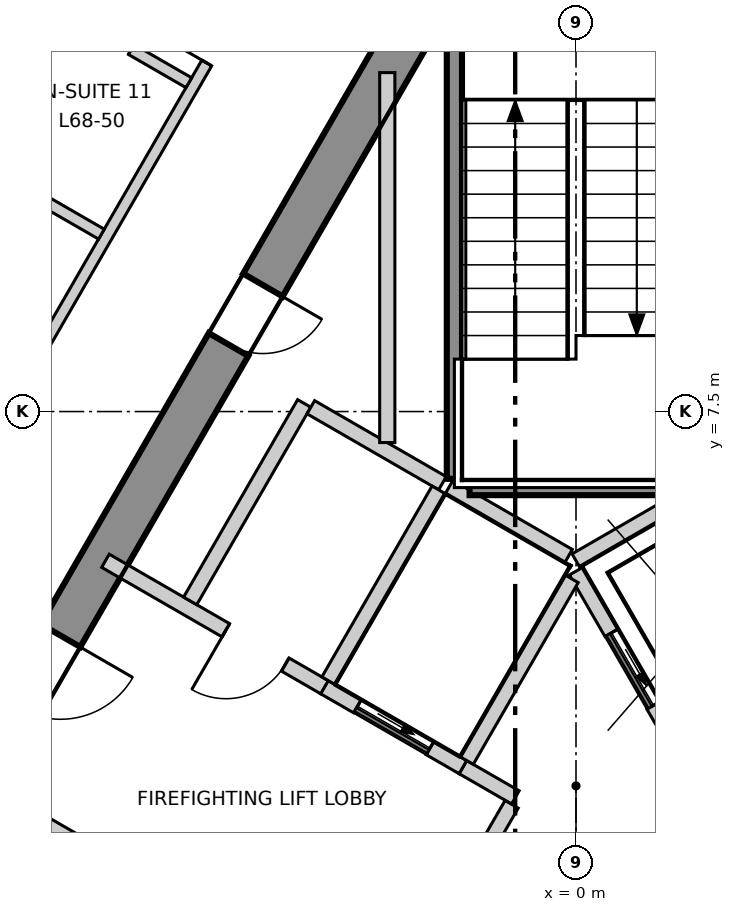
"""IFC4 building model, lengths in metres.
Left out: names, types, materials, properties, quantities, classifications, styles, units other than length and angle.
Written with IfcOpenShell. Run it as: python <this file> out.ifc"""

import sys

from ifc_helpers import new_model, si_unit, direction, frame, frame_2d, origin, place, context, subcontext, project, spatial, polyline, rectangle, outline, extrude, element, fill, save


model = new_model("IFC4")
c1 = context("Model", 3, precision=1e-05, world=origin(), true_north=direction((0.0, 1.0)))
c2 = subcontext(c1, "Body", "Model", "MODEL_VIEW")
j1 = project(units=[si_unit("LENGTHUNIT", "METRE"), si_unit("PLANEANGLEUNIT", "RADIAN")], contexts=[c1])
p1 = place(None, origin())
s1 = spatial("IfcSite", under=j1, at=p1, CompositionType="ELEMENT")
p2 = place(p1, origin())
s2 = spatial("IfcBuilding", under=s1, at=p2, CompositionType="ELEMENT")
p3 = place(p2, frame((0.0, 0.0, 289.9)))
s3 = spatial("IfcBuildingStorey", under=s2, at=p3, CompositionType="ELEMENT", Elevation=289.9)
p4 = place(p3, frame((-1.732, 13.3, -0.3), z_axis=(0.0, 0.0, 1.0), x_axis=(-0.500000539815, -0.866025092122, 0.0)))
e1 = element("IfcWall", 1, at=p4, inside=s3, PredefinedType="SHEAR", context=c2, shape_type="SweptSolid", body=[
    extrude(outline(polyline([(-0.173, -0.3), (1.795, -0.3), (3.763, -0.3), (5.732, -0.3), (7.7, -0.3), (9.668, -0.301), (11.637, -0.301), (13.605, -0.301), (15.573, -0.301), (17.542, -0.301), (19.51, -0.301), (21.478, -0.301), (21.131, 0.3), (19.226, 0.3), (17.321, 0.3), (15.415, 0.3), (13.51, 0.3), (11.605, 0.3), (9.699, 0.3), (7.794, 0.3), (5.889, 0.3), (3.984, 0.3), (2.078, 0.3), (0.173, 0.3), (-0.173, -0.3)])), origin(), (0.0, 0.0, 1.0), 3.6),
])
p5 = place(p4, frame((10.102, 0.0, 0.3)))
e2 = element("IfcOpeningElement", 2, at=p5, cuts=e1, PredefinedType="OPENING", context=c2, shape_type="SweptSolid", body=[
    extrude(rectangle(XDim=1.1, YDim=2.1, at=frame_2d((0.55, 1.05))), frame((0.0, 0.31, 0.0), z_axis=(0.0, -1.0, 0.0), x_axis=(1.0, 0.0, 0.0)), (0.0, 0.0, 1.0), 0.621),
])
p6 = place(p4, frame((16.328, 0.0, 0.3)))
e3 = element("IfcOpeningElement", 3, at=p6, cuts=e1, PredefinedType="OPENING", context=c2, shape_type="SweptSolid", body=[
    extrude(rectangle(XDim=1.0, YDim=2.1, at=frame_2d((0.5, 1.05))), frame((0.0, 0.31, 0.0), z_axis=(0.0, -1.0, 0.0), x_axis=(1.0, 0.0, 0.0)), (0.0, 0.0, 1.0), 0.621),
])
p7 = place(p4, frame((4.777, 0.0, 0.3)))
e4 = element("IfcOpeningElement", 4, at=p7, cuts=e1, PredefinedType="OPENING", context=c2, shape_type="SweptSolid", body=[
    extrude(rectangle(XDim=0.9, YDim=2.1, at=frame_2d((0.45, 1.05))), frame((0.0, 0.31, 0.0), z_axis=(0.0, -1.0, 0.0), x_axis=(1.0, 0.0, 0.0)), (0.0, 0.0, 1.0), 0.621),
])
p8 = place(p3, frame((-2.494, 27.86, 0.0), z_axis=(0.0, 0.0, 1.0), x_axis=(-0.500008134474, -0.866020707292, 0.0)))
e5 = element("IfcWall", 5, at=p8, inside=s3, PredefinedType="ELEMENTEDWALL", context=c2, shape_type="SweptSolid", body=[
    extrude(rectangle(XDim=45.741, YDim=0.2, at=frame_2d((22.871, 0.0))), origin(), (0.0, 0.0, 1.0), 3.3),
])
p9 = place(p8, frame((2.15, 0.0, 0.9)))
e6 = element("IfcOpeningElement", 6, at=p9, cuts=e5, PredefinedType="OPENING", context=c2, shape_type="SweptSolid", body=[
    extrude(rectangle(XDim=3.7, YDim=2.2, at=frame_2d((1.85, 1.1))), frame((0.0, 0.11, 0.0), z_axis=(0.0, -1.0, 0.0), x_axis=(1.0, 0.0, 0.0)), (0.0, 0.0, 1.0), 0.22),
])
p10 = place(p8, frame((7.544, 0.0, 0.9)))
e7 = element("IfcOpeningElement", 7, at=p10, cuts=e5, PredefinedType="OPENING", context=c2, shape_type="SweptSolid", body=[
    extrude(rectangle(XDim=3.7, YDim=2.2, at=frame_2d((1.85, 1.1))), frame((0.0, 0.11, 0.0), z_axis=(0.0, -1.0, 0.0), x_axis=(1.0, 0.0, 0.0)), (0.0, 0.0, 1.0), 0.22),
])
p11 = place(p8, frame((12.939, 0.0, 0.9)))
e8 = element("IfcOpeningElement", 8, at=p11, cuts=e5, PredefinedType="OPENING", context=c2, shape_type="SweptSolid", body=[
    extrude(rectangle(XDim=3.7, YDim=2.2, at=frame_2d((1.85, 1.1))), frame((0.0, 0.11, 0.0), z_axis=(0.0, -1.0, 0.0), x_axis=(1.0, 0.0, 0.0)), (0.0, 0.0, 1.0), 0.22),
])
p12 = place(p8, frame((18.333, 0.0, 0.9)))
e9 = element("IfcOpeningElement", 9, at=p12, cuts=e5, PredefinedType="OPENING", context=c2, shape_type="SweptSolid", body=[
    extrude(rectangle(XDim=3.7, YDim=2.2, at=frame_2d((1.85, 1.1))), frame((0.0, 0.11, 0.0), z_axis=(0.0, -1.0, 0.0), x_axis=(1.0, 0.0, 0.0)), (0.0, 0.0, 1.0), 0.22),
])
p13 = place(p8, frame((23.728, 0.0, 0.9)))
e10 = element("IfcOpeningElement", 10, at=p13, cuts=e5, PredefinedType="OPENING", context=c2, shape_type="SweptSolid", body=[
    extrude(rectangle(XDim=3.7, YDim=2.2, at=frame_2d((1.85, 1.1))), frame((0.0, 0.11, 0.0), z_axis=(0.0, -1.0, 0.0), x_axis=(1.0, 0.0, 0.0)), (0.0, 0.0, 1.0), 0.22),
])
p14 = place(p8, frame((29.122, 0.0, 0.9)))
e11 = element("IfcOpeningElement", 11, at=p14, cuts=e5, PredefinedType="OPENING", context=c2, shape_type="SweptSolid", body=[
    extrude(rectangle(XDim=3.7, YDim=2.2, at=frame_2d((1.85, 1.1))), frame((0.0, 0.11, 0.0), z_axis=(0.0, -1.0, 0.0), x_axis=(1.0, 0.0, 0.0)), (0.0, 0.0, 1.0), 0.22),
])
p15 = place(p8, frame((34.517, 0.0, 0.9)))
e12 = element("IfcOpeningElement", 12, at=p15, cuts=e5, PredefinedType="OPENING", context=c2, shape_type="SweptSolid", body=[
    extrude(rectangle(XDim=3.7, YDim=2.2, at=frame_2d((1.85, 1.1))), frame((0.0, 0.11, 0.0), z_axis=(0.0, -1.0, 0.0), x_axis=(1.0, 0.0, 0.0)), (0.0, 0.0, 1.0), 0.22),
])
p16 = place(p8, frame((39.911, 0.0, 0.9)))
e13 = element("IfcOpeningElement", 13, at=p16, cuts=e5, PredefinedType="OPENING", context=c2, shape_type="SweptSolid", body=[
    extrude(rectangle(XDim=3.7, YDim=2.2, at=frame_2d((1.85, 1.1))), frame((0.0, 0.11, 0.0), z_axis=(0.0, -1.0, 0.0), x_axis=(1.0, 0.0, 0.0)), (0.0, 0.0, 1.0), 0.22),
])
p17 = place(p3, frame((-17.679, -10.12, 0.0), z_axis=(0.0, 0.0, 1.0), x_axis=(0.500008955215, 0.866020233427, 0.0)))
e14 = element("IfcWall", 14, at=p17, inside=s3, PredefinedType="PARTITIONING", context=c2, shape_type="SweptSolid", body=[
    extrude(rectangle(XDim=35.357, YDim=0.15, at=frame_2d((17.679, 0.0))), origin(), (0.0, 0.0, 1.0), 3.3),
])
p18 = place(p17, frame((31.407, 0.0, 0.0)))
e15 = element("IfcOpeningElement", 15, at=p18, cuts=e14, PredefinedType="OPENING", context=c2, shape_type="SweptSolid", body=[
    extrude(rectangle(XDim=1.0, YDim=2.1, at=frame_2d((0.5, 1.05))), frame((0.0, 0.085, 0.0), z_axis=(0.0, -1.0, 0.0), x_axis=(1.0, 0.0, 0.0)), (0.0, 0.0, 1.0), 0.17),
])
p19 = place(p17, frame((25.642, 0.0, 0.0)))
e16 = element("IfcOpeningElement", 16, at=p19, cuts=e14, PredefinedType="OPENING", context=c2, shape_type="SweptSolid", body=[
    extrude(rectangle(XDim=1.0, YDim=2.1, at=frame_2d((0.5, 1.05))), frame((0.0, 0.085, 0.0), z_axis=(0.0, -1.0, 0.0), x_axis=(1.0, 0.0, 0.0)), (0.0, 0.0, 1.0), 0.17),
])
p20 = place(p17, frame((18.348, 0.0, 0.0)))
e17 = element("IfcOpeningElement", 17, at=p20, cuts=e14, PredefinedType="OPENING", context=c2, shape_type="SweptSolid", body=[
    extrude(rectangle(XDim=1.0, YDim=2.1, at=frame_2d((0.5, 1.05))), frame((0.0, 0.085, 0.0), z_axis=(0.0, -1.0, 0.0), x_axis=(1.0, 0.0, 0.0)), (0.0, 0.0, 1.0), 0.17),
])
p21 = place(p17, frame((13.254, 0.0, 0.0)))
e18 = element("IfcOpeningElement", 18, at=p21, cuts=e14, PredefinedType="OPENING", context=c2, shape_type="SweptSolid", body=[
    extrude(rectangle(XDim=1.0, YDim=2.1, at=frame_2d((0.5, 1.05))), frame((0.0, 0.085, 0.0), z_axis=(0.0, -1.0, 0.0), x_axis=(1.0, 0.0, 0.0)), (0.0, 0.0, 1.0), 0.17),
])
p22 = place(p17, frame((7.559, 0.0, 0.0)))
e19 = element("IfcOpeningElement", 19, at=p22, cuts=e14, PredefinedType="OPENING", context=c2, shape_type="SweptSolid", body=[
    extrude(rectangle(XDim=1.0, YDim=2.1, at=frame_2d((0.5, 1.05))), frame((0.0, 0.085, 0.0), z_axis=(0.0, -1.0, 0.0), x_axis=(1.0, 0.0, 0.0)), (0.0, 0.0, 1.0), 0.17),
])
p23 = place(p17, frame((2.865, 0.0, 0.0)))
e20 = element("IfcOpeningElement", 20, at=p23, cuts=e14, PredefinedType="OPENING", context=c2, shape_type="SweptSolid", body=[
    extrude(rectangle(XDim=1.0, YDim=2.1, at=frame_2d((0.5, 1.05))), frame((0.0, 0.085, 0.0), z_axis=(0.0, -1.0, 0.0), x_axis=(1.0, 0.0, 0.0)), (0.0, 0.0, 1.0), 0.17),
])
p24 = place(p3, frame((-11.168, 12.677, 0.0), z_axis=(0.0, 0.0, 1.0), x_axis=(0.866017549727, -0.50001360338, 0.0)))
e21 = element("IfcWall", 21, at=p24, inside=s3, PredefinedType="PARTITIONING", context=c2, shape_type="SweptSolid", body=[
    extrude(rectangle(XDim=5.686, YDim=0.15, at=frame_2d((2.843, 0.0))), origin(), (0.0, 0.0, 1.0), 3.3),
])
p25 = place(p3, frame((0.075, 20.37, 0.0), z_axis=(0.0, 0.0, 1.0), x_axis=(0.500009775255, -0.866019759965, 0.0)))
e22 = element("IfcWall", 22, at=p25, inside=s3, PredefinedType="PARTITIONING", context=c2, shape_type="SweptSolid", body=[
    extrude(rectangle(XDim=35.207, YDim=0.15, at=frame_2d((17.604, 0.0))), origin(), (0.0, 0.0, 1.0), 3.3),
])
p26 = place(p25, frame((31.407, 0.0, 0.0)))
e23 = element("IfcOpeningElement", 23, at=p26, cuts=e22, PredefinedType="OPENING", context=c2, shape_type="SweptSolid", body=[
    extrude(rectangle(XDim=1.0, YDim=2.1, at=frame_2d((0.5, 1.05))), frame((0.0, 0.085, 0.0), z_axis=(0.0, -1.0, 0.0), x_axis=(1.0, 0.0, 0.0)), (0.0, 0.0, 1.0), 0.17),
])
p27 = place(p25, frame((19.243, 0.0, 0.0)))
e24 = element("IfcOpeningElement", 24, at=p27, cuts=e22, PredefinedType="OPENING", context=c2, shape_type="SweptSolid", body=[
    extrude(rectangle(XDim=1.0, YDim=2.1, at=frame_2d((0.5, 1.05))), frame((0.0, 0.085, 0.0), z_axis=(0.0, -1.0, 0.0), x_axis=(1.0, 0.0, 0.0)), (0.0, 0.0, 1.0), 0.17),
])
p28 = place(p25, frame((24.543, 0.0, 0.0)))
e25 = element("IfcOpeningElement", 25, at=p28, cuts=e22, PredefinedType="OPENING", context=c2, shape_type="SweptSolid", body=[
    extrude(rectangle(XDim=0.9, YDim=2.1, at=frame_2d((0.45, 1.05))), frame((0.0, 0.085, 0.0), z_axis=(0.0, -1.0, 0.0), x_axis=(1.0, 0.0, 0.0)), (0.0, 0.0, 1.0), 0.17),
])
p29 = place(p25, frame((22.443, 0.0, 0.0)))
e26 = element("IfcOpeningElement", 26, at=p29, cuts=e22, PredefinedType="OPENING", context=c2, shape_type="SweptSolid", body=[
    extrude(rectangle(XDim=0.9, YDim=2.1, at=frame_2d((0.45, 1.05))), frame((0.0, 0.085, 0.0), z_axis=(0.0, -1.0, 0.0), x_axis=(1.0, 0.0, 0.0)), (0.0, 0.0, 1.0), 0.17),
])
p30 = place(p25, frame((13.253, 0.0, 0.0)))
e27 = element("IfcOpeningElement", 27, at=p30, cuts=e22, PredefinedType="OPENING", context=c2, shape_type="SweptSolid", body=[
    extrude(rectangle(XDim=1.0, YDim=2.1, at=frame_2d((0.5, 1.05))), frame((0.0, 0.085, 0.0), z_axis=(0.0, -1.0, 0.0), x_axis=(1.0, 0.0, 0.0)), (0.0, 0.0, 1.0), 0.17),
])
p31 = place(p25, frame((5.559, 0.0, 0.0)))
e28 = element("IfcOpeningElement", 28, at=p31, cuts=e22, PredefinedType="OPENING", context=c2, shape_type="SweptSolid", body=[
    extrude(rectangle(XDim=1.0, YDim=2.1, at=frame_2d((0.5, 1.05))), frame((0.0, 0.085, 0.0), z_axis=(0.0, -1.0, 0.0), x_axis=(1.0, 0.0, 0.0)), (0.0, 0.0, 1.0), 0.17),
])
p32 = place(p3, frame((-7.303, 13.101, 0.0), z_axis=(0.0, 0.0, 1.0), x_axis=(0.866061263272, -0.499937884402, 0.0)))
e29 = element("IfcWall", 29, at=p32, inside=s3, PredefinedType="PARTITIONING", context=c2, shape_type="SweptSolid", body=[
    extrude(rectangle(XDim=2.551, YDim=0.15, at=frame_2d((1.275, 0.0))), origin(), (0.0, 0.0, 1.0), 3.3),
])
p33 = place(p32, frame((0.775, 0.0, 0.0)))
e30 = element("IfcOpeningElement", 30, at=p33, cuts=e29, PredefinedType="OPENING", context=c2, shape_type="SweptSolid", body=[
    extrude(rectangle(XDim=0.9, YDim=2.1, at=frame_2d((0.45, 1.05))), frame((0.0, 0.085, 0.0), z_axis=(0.0, -1.0, 0.0), x_axis=(1.0, 0.0, 0.0)), (0.0, 0.0, 1.0), 0.17),
])
p34 = place(p3, frame((-0.002, 5.541, 0.0), z_axis=(0.0, 0.0, 1.0), x_axis=(0.86600155993, 0.500041296494, 0.0)))
e31 = element("IfcWall", 31, at=p34, inside=s3, PredefinedType="SOLIDWALL", context=c2, shape_type="SweptSolid", body=[
    extrude(rectangle(XDim=4.132, YDim=0.2, at=frame_2d((2.066, 0.0))), origin(), (0.0, 0.0, 1.0), 3.3),
])
p35 = place(p3, frame((0.0, 5.4, 0.0), z_axis=(0.0, 0.0, 1.0), x_axis=(0.500103862429, -0.865965430478, 0.0)))
e32 = element("IfcWall", 32, at=p35, inside=s3, PredefinedType="SOLIDWALL", context=c2, shape_type="SweptSolid", body=[
    extrude(rectangle(XDim=2.973, YDim=0.2, at=frame_2d((1.487, 0.0))), origin(), (0.0, 0.0, 1.0), 3.3),
])
p36 = place(p35, frame((0.937, 0.0, 0.0)))
e33 = element("IfcOpeningElement", 33, at=p36, cuts=e32, PredefinedType="OPENING", context=c2, shape_type="SweptSolid", body=[
    extrude(rectangle(XDim=1.1, YDim=2.1, at=frame_2d((0.55, 1.05))), frame((0.0, 0.11, 0.0), z_axis=(0.0, -1.0, 0.0), x_axis=(1.0, 0.0, 0.0)), (0.0, 0.0, 1.0), 0.22),
])
p37 = place(p3, frame((-7.891, 2.593, 0.0), z_axis=(0.0, 0.0, 1.0), x_axis=(0.866070917804, -0.499921159118, 0.0)))
e34 = element("IfcWall", 34, at=p37, inside=s3, PredefinedType="SOLIDWALL", context=c2, shape_type="SweptSolid", body=[
    extrude(rectangle(XDim=3.333, YDim=0.2, at=frame_2d((1.666, 0.0))), origin(), (0.0, 0.0, 1.0), 3.3),
])
p38 = place(p37, frame((1.73, 0.0, 0.0)))
e35 = element("IfcOpeningElement", 35, at=p38, cuts=e34, PredefinedType="OPENING", context=c2, shape_type="SweptSolid", body=[
    extrude(rectangle(XDim=1.1, YDim=2.1, at=frame_2d((0.55, 1.05))), frame((0.0, 0.11, 0.0), z_axis=(0.0, -1.0, 0.0), x_axis=(1.0, 0.0, 0.0)), (0.0, 0.0, 1.0), 0.22),
])
p39 = place(p3, frame((-6.191, 5.537, 0.0), z_axis=(0.0, 0.0, 1.0), x_axis=(0.866052607023, -0.499952879648, 0.0)))
e36 = element("IfcWall", 36, at=p39, inside=s3, PredefinedType="SOLIDWALL", context=c2, shape_type="SweptSolid", body=[
    extrude(rectangle(XDim=3.332, YDim=0.2, at=frame_2d((1.666, 0.0))), origin(), (0.0, 0.0, 1.0), 3.3),
])
p40 = place(p39, frame((1.83, 0.0, 0.0)))
e37 = element("IfcOpeningElement", 37, at=p40, cuts=e36, PredefinedType="OPENING", context=c2, shape_type="SweptSolid", body=[
    extrude(rectangle(XDim=0.9, YDim=2.1, at=frame_2d((0.45, 1.05))), frame((0.0, 0.11, 0.0), z_axis=(0.0, -1.0, 0.0), x_axis=(1.0, 0.0, 0.0)), (0.0, 0.0, 1.0), 0.22),
])
p41 = place(p3, frame((-1.488, 2.822, 0.0), z_axis=(0.0, 0.0, 1.0), x_axis=(0.866236612152, -0.499633997809, 0.0)))
e38 = element("IfcWall", 38, at=p41, inside=s3, PredefinedType="SOLIDWALL", context=c2, shape_type="SweptSolid", body=[
    extrude(rectangle(XDim=0.796, YDim=0.2, at=frame_2d((0.398, 0.0))), origin(), (0.0, 0.0, 1.0), 3.3),
])
p42 = place(p3, frame((-5.076, 5.009, 0.0), z_axis=(0.0, 0.0, 1.0), x_axis=(0.50002537861, 0.866010750942, 0.0)))
e39 = element("IfcWall", 39, at=p42, inside=s3, PredefinedType="SOLIDWALL", context=c2, shape_type="SweptSolid", body=[
    extrude(rectangle(XDim=3.0, YDim=0.2, at=frame_2d((1.5, 0.0))), origin(), (0.0, 0.0, 1.0), 3.3),
])
p43 = place(p3, frame((-3.489, 7.557, 0.0), z_axis=(0.0, 0.0, 1.0), x_axis=(0.866010750942, -0.50002537861, 0.0)))
e40 = element("IfcWall", 40, at=p43, inside=s3, PredefinedType="SOLIDWALL", context=c2, shape_type="SweptSolid", body=[
    extrude(rectangle(XDim=2.0, YDim=0.2, at=frame_2d((1.0, 0.0))), origin(), (0.0, 0.0, 1.0), 3.3),
])
p44 = place(p3, frame((-2.444, -0.433, 0.0), z_axis=(0.0, 0.0, 1.0), x_axis=(0.500035624827, 0.866004834804, 0.0)))
e41 = element("IfcWall", 41, at=p44, inside=s3, PredefinedType="SOLIDWALL", context=c2, shape_type="SweptSolid", body=[
    extrude(rectangle(XDim=3.194, YDim=0.2, at=frame_2d((1.597, 0.0))), origin(), (0.0, 0.0, 1.0), 3.3),
])
p45 = place(p3, frame((-3.309, 3.873, 0.0), z_axis=(0.0, 0.0, 1.0), x_axis=(0.866098583652, -0.499873227325, 0.0)))
e42 = element("IfcWall", 42, at=p45, inside=s3, PredefinedType="SOLIDWALL", context=c2, shape_type="SweptSolid", body=[
    extrude(rectangle(XDim=2.103, YDim=0.2, at=frame_2d((1.051, 0.0))), origin(), (0.0, 0.0, 1.0), 3.3),
])
p46 = place(p45, frame((0.502, 0.0, 0.0)))
e43 = element("IfcOpeningElement", 43, at=p46, cuts=e42, PredefinedType="OPENING", context=c2, shape_type="SweptSolid", body=[
    extrude(rectangle(XDim=1.1, YDim=2.1, at=frame_2d((0.55, 1.05))), frame((0.0, 0.11, 0.0), z_axis=(0.0, -1.0, 0.0), x_axis=(1.0, 0.0, 0.0)), (0.0, 0.0, 1.0), 0.22),
])
p47 = place(p3, frame((-3.257, 3.959, 0.0), z_axis=(0.0, 0.0, 1.0), x_axis=(0.50012328804, 0.865954211699, 0.0)))
e44 = element("IfcWall", 44, at=p47, inside=s3, PredefinedType="SOLIDWALL", context=c2, shape_type="SweptSolid", body=[
    extrude(rectangle(XDim=2.9, YDim=0.2, at=frame_2d((1.45, 0.0))), origin(), (0.0, 0.0, 1.0), 3.3),
])
p48 = place(p3, frame((-1.67, 6.507, 0.0), z_axis=(0.0, 0.0, 1.0), x_axis=(0.865941441609, -0.500145398563, 0.0)))
e45 = element("IfcWall", 45, at=p48, inside=s3, PredefinedType="SOLIDWALL", context=c2, shape_type="SweptSolid", body=[
    extrude(rectangle(XDim=1.815, YDim=0.2, at=frame_2d((0.908, 0.0))), origin(), (0.0, 0.0, 1.0), 3.3),
])
p49 = place(p3, frame((-1.438, 2.909, 0.0), z_axis=(0.0, 0.0, 1.0), x_axis=(0.499829630636, 0.866123744241, 0.0)))
e46 = element("IfcWall", 46, at=p49, inside=s3, PredefinedType="SOLIDWALL", context=c2, shape_type="SweptSolid", body=[
    extrude(rectangle(XDim=2.761, YDim=0.2, at=frame_2d((1.38, 0.0))), origin(), (0.0, 0.0, 1.0), 3.3),
])
p50 = place(p3, frame((-2.483, 7.092, 0.0), z_axis=(0.0, 0.0, 1.0), x_axis=(0.0, 1.0, 0.0)))
e47 = element("IfcWall", 47, at=p50, inside=s3, PredefinedType="SOLIDWALL", context=c2, shape_type="SweptSolid", body=[
    extrude(rectangle(XDim=4.867, YDim=0.2, at=frame_2d((2.434, 0.0))), origin(), (0.0, 0.0, 1.0), 3.3),
])
p51 = place(p3, frame((-1.4, 6.5, 0.0), z_axis=(0.0, 0.0, 1.0), x_axis=(1.0, 0.0, 0.0)))
e48 = element("IfcWall", 48, at=p51, inside=s3, PredefinedType="SOLIDWALL", context=c2, shape_type="SweptSolid", body=[
    extrude(rectangle(XDim=2.8, YDim=0.2, at=frame_2d((1.4, 0.0))), origin(), (0.0, 0.0, 1.0), 3.3),
])
p52 = place(p3, frame((-1.6, 6.615, 0.0), z_axis=(0.0, 0.0, 1.0), x_axis=(0.0, 1.0, 0.0)))
e49 = element("IfcWall", 49, at=p52, inside=s3, PredefinedType="SOLIDWALL", context=c2, shape_type="SweptSolid", body=[
    extrude(rectangle(XDim=6.665, YDim=0.2, at=frame_2d((3.333, 0.0))), origin(), (0.0, 0.0, 1.0), 3.3),
])
p53 = place(p36, origin())
e50 = element("IfcDoor", 50, at=p53, inside=s3, OperationType="SLIDING_TO_LEFT", PredefinedType="DOOR", context=c2, shape_type="SweptSolid", body=[
    extrude(rectangle(XDim=1.1, YDim=2.1, at=frame_2d((0.55, 1.05))), frame((0.0, 0.025, 0.0), z_axis=(0.0, -1.0, 0.0), x_axis=(1.0, 0.0, 0.0)), (0.0, 0.0, 1.0), 0.05),
])
fill(e33, e50)
p54 = place(p46, origin())
e51 = element("IfcDoor", 51, at=p54, inside=s3, OperationType="SLIDING_TO_LEFT", PredefinedType="DOOR", context=c2, shape_type="SweptSolid", body=[
    extrude(rectangle(XDim=1.1, YDim=2.1, at=frame_2d((0.55, 1.05))), frame((0.0, 0.025, 0.0), z_axis=(0.0, -1.0, 0.0), x_axis=(1.0, 0.0, 0.0)), (0.0, 0.0, 1.0), 0.05),
])
fill(e43, e51)
p55 = place(p40, origin())
e52 = element("IfcDoor", 52, at=p55, inside=s3, OperationType="SINGLE_SWING_LEFT", PredefinedType="DOOR", context=c2, shape_type="SweptSolid", body=[
    extrude(rectangle(XDim=0.9, YDim=2.1, at=frame_2d((0.45, 1.05))), frame((0.0, 0.025, 0.0), z_axis=(0.0, -1.0, 0.0), x_axis=(1.0, 0.0, 0.0)), (0.0, 0.0, 1.0), 0.05),
])
fill(e37, e52)
p56 = place(p19, origin())
e53 = element("IfcDoor", 53, at=p56, inside=s3, OperationType="SINGLE_SWING_RIGHT", PredefinedType="DOOR", context=c2, shape_type="SweptSolid", body=[
    extrude(rectangle(XDim=1.0, YDim=2.1, at=frame_2d((0.5, 1.05))), frame((0.0, 0.025, 0.0), z_axis=(0.0, -1.0, 0.0), x_axis=(1.0, 0.0, 0.0)), (0.0, 0.0, 1.0), 0.05),
])
fill(e16, e53)
p57 = place(p5, origin())
e54 = element("IfcDoor", 54, at=p57, inside=s3, OperationType="SINGLE_SWING_RIGHT", PredefinedType="DOOR", context=c2, shape_type="SweptSolid", body=[
    extrude(rectangle(XDim=1.1, YDim=2.1, at=frame_2d((0.55, 1.05))), frame((0.0, 0.025, 0.0), z_axis=(0.0, -1.0, 0.0), x_axis=(1.0, 0.0, 0.0)), (0.0, 0.0, 1.0), 0.05),
])
fill(e2, e54)
p58 = place(p7, origin())
e55 = element("IfcDoor", 55, at=p58, inside=s3, OperationType="SINGLE_SWING_RIGHT", PredefinedType="DOOR", context=c2, shape_type="SweptSolid", body=[
    extrude(rectangle(XDim=0.9, YDim=2.1, at=frame_2d((0.45, 1.05))), frame((0.0, 0.025, 0.0), z_axis=(0.0, -1.0, 0.0), x_axis=(1.0, 0.0, 0.0)), (0.0, 0.0, 1.0), 0.05),
])
fill(e4, e55)
save(model, sys.argv[1])
